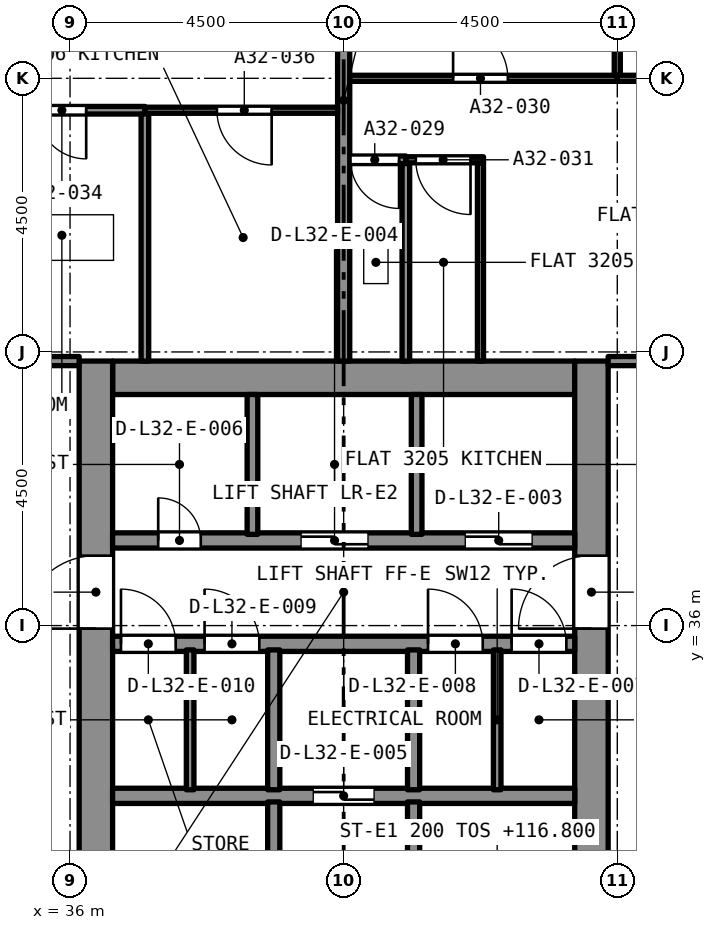
"""IFC4 building model, lengths in metres.
Left out: names, types, materials, properties, quantities, classifications, styles, units other than length and angle.
Written with IfcOpenShell. Run it as: python <this file> out.ifc"""

import sys

from ifc_helpers import new_model, si_unit, direction, frame, frame_2d, origin, place, context, subcontext, project, spatial, rectangle, extrude, element, fill, save


model = new_model("IFC4")
c1 = context("Model", 3, precision=1e-05, world=origin(), true_north=direction((0.0, 1.0)))
c2 = subcontext(c1, "Body", "Model", "MODEL_VIEW")
j1 = project(units=[si_unit("LENGTHUNIT", "METRE"), si_unit("PLANEANGLEUNIT", "RADIAN")], contexts=[c1])
p1 = place(None, origin())
s1 = spatial("IfcSite", under=j1, at=p1, CompositionType="ELEMENT")
p2 = place(p1, origin())
s2 = spatial("IfcBuilding", under=s1, at=p2, CompositionType="ELEMENT")
p3 = place(p2, frame((0.0, 0.0, 115.2)))
s3 = spatial("IfcBuildingStorey", under=s2, at=p3, CompositionType="ELEMENT", Elevation=115.2)
p4 = place(p3, frame((36.7, 40.075, 0.0), z_axis=(0.0, 0.0, 1.0), x_axis=(1.0, 0.0, 0.0)))
e1 = element("IfcWall", 1, at=p4, inside=s3, PredefinedType="SOLIDWALL", context=c2, shape_type="SweptSolid", body=[
    extrude(rectangle(XDim=7.6, YDim=0.55, at=frame_2d((3.8, 0.0))), origin(), (0.0, 0.0, 1.0), 3.2),
])
p5 = place(p3, frame((36.425, 27.15, 0.0), z_axis=(0.0, 0.0, 1.0), x_axis=(0.0, 1.0, 0.0)))
e2 = element("IfcWall", 2, at=p5, inside=s3, PredefinedType="SOLIDWALL", context=c2, shape_type="SweptSolid", body=[
    extrude(rectangle(XDim=13.2, YDim=0.55, at=frame_2d((6.6, 0.0))), origin(), (0.0, 0.0, 1.0), 3.2),
])
p6 = place(p5, frame((8.8, 0.0, 0.0)))
e3 = element("IfcOpeningElement", 3, at=p6, cuts=e2, PredefinedType="OPENING", context=c2, shape_type="SweptSolid", body=[
    extrude(rectangle(XDim=1.2, YDim=2.1, at=frame_2d((0.6, 1.05))), frame((0.0, 0.285, 0.0), z_axis=(0.0, -1.0, 0.0), x_axis=(1.0, 0.0, 0.0)), (0.0, 0.0, 1.0), 0.57),
])
p7 = place(p3, frame((44.575, 27.15, 0.0), z_axis=(0.0, 0.0, 1.0), x_axis=(0.0, 1.0, 0.0)))
e4 = element("IfcWall", 4, at=p7, inside=s3, PredefinedType="SOLIDWALL", context=c2, shape_type="SweptSolid", body=[
    extrude(rectangle(XDim=13.2, YDim=0.55, at=frame_2d((6.6, 0.0))), origin(), (0.0, 0.0, 1.0), 3.2),
])
p8 = place(p7, frame((8.8, 0.0, 0.0)))
e5 = element("IfcOpeningElement", 5, at=p8, cuts=e4, PredefinedType="OPENING", context=c2, shape_type="SweptSolid", body=[
    extrude(rectangle(XDim=1.2, YDim=2.1, at=frame_2d((0.6, 1.05))), frame((0.0, 0.285, 0.0), z_axis=(0.0, -1.0, 0.0), x_axis=(1.0, 0.0, 0.0)), (0.0, 0.0, 1.0), 0.57),
])
p9 = place(p3, frame((41.523, 43.66, 0.0), z_axis=(0.0, 0.0, 1.0), x_axis=(-1.0, 0.0, 0.0)))
e6 = element("IfcWall", 6, at=p9, inside=s3, PredefinedType="PARTITIONING", context=c2, shape_type="SweptSolid", body=[
    extrude(rectangle(XDim=0.923, YDim=0.125, at=frame_2d((0.461, 0.0))), origin(), (0.0, 0.0, 1.0), 2.9),
])
p10 = place(p9, frame((0.111, 0.0, 0.0)))
e7 = element("IfcOpeningElement", 7, at=p10, cuts=e6, PredefinedType="OPENING", context=c2, shape_type="SweptSolid", body=[
    extrude(rectangle(XDim=0.8, YDim=2.1, at=frame_2d((0.4, 1.05))), frame((0.0, 0.073, 0.0), z_axis=(0.0, -1.0, 0.0), x_axis=(1.0, 0.0, 0.0)), (0.0, 0.0, 1.0), 0.145),
])
p11 = place(p3, frame((41.523, 40.35, 0.0), z_axis=(0.0, 0.0, 1.0), x_axis=(0.0, 1.0, 0.0)))
e8 = element("IfcWall", 8, at=p11, inside=s3, PredefinedType="PARTITIONING", context=c2, shape_type="SweptSolid", body=[
    extrude(rectangle(XDim=3.247, YDim=0.125, at=frame_2d((1.624, 0.0))), origin(), (0.0, 0.0, 1.0), 2.9),
])
p12 = place(p3, frame((40.5, 40.35, 0.0), z_axis=(0.0, 0.0, 1.0), x_axis=(0.0, 1.0, 0.0)))
e9 = element("IfcWall", 9, at=p12, inside=s3, PredefinedType="PARTITIONING", context=c2, shape_type="SweptSolid", body=[
    extrude(rectangle(XDim=8.575, YDim=0.2, at=frame_2d((4.288, 0.0))), origin(), (0.0, 0.0, 1.0), 2.9),
])
p13 = place(p3, frame((40.6, 45.0, 0.0), z_axis=(0.0, 0.0, 1.0), x_axis=(1.0, 0.0, 0.0)))
e10 = element("IfcWall", 10, at=p13, inside=s3, PredefinedType="PARTITIONING", context=c2, shape_type="SweptSolid", body=[
    extrude(rectangle(XDim=4.4, YDim=0.1, at=frame_2d((2.2, 0.0))), origin(), (0.0, 0.0, 1.0), 2.9),
])
p14 = place(p13, frame((1.7, 0.0, 0.0)))
e11 = element("IfcOpeningElement", 11, at=p14, cuts=e10, PredefinedType="OPENING", context=c2, shape_type="SweptSolid", body=[
    extrude(rectangle(XDim=0.9, YDim=2.1, at=frame_2d((0.45, 1.05))), frame((0.0, 0.06, 0.0), z_axis=(0.0, -1.0, 0.0), x_axis=(1.0, 0.0, 0.0)), (0.0, 0.0, 1.0), 0.12),
])
p15 = place(p3, frame((45.0, 45.05, 0.0), z_axis=(0.0, 0.0, 1.0), x_axis=(0.0, 1.0, 0.0)))
e12 = element("IfcWall", 12, at=p15, inside=s3, PredefinedType="PARTITIONING", context=c2, shape_type="SweptSolid", body=[
    extrude(rectangle(XDim=3.828, YDim=0.1, at=frame_2d((1.914, 0.0))), origin(), (0.0, 0.0, 1.0), 2.9),
])
p16 = place(p3, frame((42.75, 40.35, 0.0), z_axis=(0.0, 0.0, 1.0), x_axis=(0.0, 1.0, 0.0)))
e13 = element("IfcWall", 13, at=p16, inside=s3, PredefinedType="PARTITIONING", context=c2, shape_type="SweptSolid", body=[
    extrude(rectangle(XDim=3.26, YDim=0.1, at=frame_2d((1.63, 0.0))), origin(), (0.0, 0.0, 1.0), 2.9),
])
p17 = place(p3, frame((42.8, 43.66, 0.0), z_axis=(0.0, 0.0, 1.0), x_axis=(-1.0, 0.0, 0.0)))
e14 = element("IfcWall", 14, at=p17, inside=s3, PredefinedType="PARTITIONING", context=c2, shape_type="SweptSolid", body=[
    extrude(rectangle(XDim=1.277, YDim=0.1, at=frame_2d((0.639, 0.0))), origin(), (0.0, 0.0, 1.0), 2.9),
])
p18 = place(p17, frame((0.214, 0.0, 0.0)))
e15 = element("IfcOpeningElement", 15, at=p18, cuts=e14, PredefinedType="OPENING", context=c2, shape_type="SweptSolid", body=[
    extrude(rectangle(XDim=0.9, YDim=2.1, at=frame_2d((0.45, 1.05))), frame((0.0, 0.06, 0.0), z_axis=(0.0, -1.0, 0.0), x_axis=(1.0, 0.0, 0.0)), (0.0, 0.0, 1.0), 0.12),
])
p19 = place(p3, frame((45.0, 45.0, 0.0), z_axis=(0.0, 0.0, 1.0), x_axis=(1.0, 0.0, 0.0)))
e16 = element("IfcWall", 16, at=p19, inside=s3, PredefinedType="PARTITIONING", context=c2, shape_type="SweptSolid", body=[
    extrude(rectangle(XDim=3.878, YDim=0.1, at=frame_2d((1.939, 0.0))), origin(), (0.0, 0.0, 1.0), 2.9),
])
p20 = place(p19, frame((1.462, 0.0, 0.0)))
e17 = element("IfcOpeningElement", 17, at=p20, cuts=e16, PredefinedType="OPENING", context=c2, shape_type="SweptSolid", body=[
    extrude(rectangle(XDim=1.0, YDim=2.1, at=frame_2d((0.5, 1.05))), frame((0.0, 0.06, 0.0), z_axis=(0.0, -1.0, 0.0), x_axis=(1.0, 0.0, 0.0)), (0.0, 0.0, 1.0), 0.12),
])
p21 = place(p3, frame((44.85, 40.35, 0.0), z_axis=(0.0, 0.0, 1.0), x_axis=(1.0, 0.0, 0.0)))
e18 = element("IfcWall", 18, at=p21, inside=s3, PredefinedType="PARTITIONING", context=c2, shape_type="SweptSolid", body=[
    extrude(rectangle(XDim=4.075, YDim=0.15, at=frame_2d((2.038, 0.0))), origin(), (0.0, 0.0, 1.0), 2.9),
])
p22 = place(p21, frame((1.9, 0.0, 0.0)))
e19 = element("IfcOpeningElement", 19, at=p22, cuts=e18, PredefinedType="OPENING", context=c2, shape_type="SweptSolid", body=[
    extrude(rectangle(XDim=1.0, YDim=2.1, at=frame_2d((0.5, 1.05))), frame((0.0, 0.085, 0.0), z_axis=(0.0, -1.0, 0.0), x_axis=(1.0, 0.0, 0.0)), (0.0, 0.0, 1.0), 0.17),
])
p23 = place(p3, frame((37.231, 44.475, 0.0), z_axis=(0.0, 0.0, 1.0), x_axis=(-1.0, 0.0, 0.0)))
e20 = element("IfcWall", 20, at=p23, inside=s3, PredefinedType="PARTITIONING", context=c2, shape_type="SweptSolid", body=[
    extrude(rectangle(XDim=2.794, YDim=0.125, at=frame_2d((1.397, 0.0))), origin(), (0.0, 0.0, 1.0), 2.9),
])
p24 = place(p23, frame((0.966, 0.0, 0.0)))
e21 = element("IfcOpeningElement", 21, at=p24, cuts=e20, PredefinedType="OPENING", context=c2, shape_type="SweptSolid", body=[
    extrude(rectangle(XDim=0.8, YDim=2.1, at=frame_2d((0.4, 1.05))), frame((0.0, 0.073, 0.0), z_axis=(0.0, -1.0, 0.0), x_axis=(1.0, 0.0, 0.0)), (0.0, 0.0, 1.0), 0.145),
])
p25 = place(p3, frame((37.231, 40.35, 0.0), z_axis=(0.0, 0.0, 1.0), x_axis=(0.0, 1.0, 0.0)))
e22 = element("IfcWall", 22, at=p25, inside=s3, PredefinedType="PARTITIONING", context=c2, shape_type="SweptSolid", body=[
    extrude(rectangle(XDim=4.062, YDim=0.125, at=frame_2d((2.031, 0.0))), origin(), (0.0, 0.0, 1.0), 2.9),
])
p26 = place(p3, frame((34.5, 40.35, 0.0), z_axis=(0.0, 0.0, 1.0), x_axis=(1.0, 0.0, 0.0)))
e23 = element("IfcWall", 23, at=p26, inside=s3, PredefinedType="PARTITIONING", context=c2, shape_type="SweptSolid", body=[
    extrude(rectangle(XDim=1.65, YDim=0.15, at=frame_2d((0.825, 0.0))), origin(), (0.0, 0.0, 1.0), 2.9),
])
p27 = place(p3, frame((40.4, 44.475, 0.0), z_axis=(0.0, 0.0, 1.0), x_axis=(-1.0, 0.0, 0.0)))
e24 = element("IfcWall", 24, at=p27, inside=s3, PredefinedType="PARTITIONING", context=c2, shape_type="SweptSolid", body=[
    extrude(rectangle(XDim=3.168, YDim=0.1, at=frame_2d((1.584, 0.0))), origin(), (0.0, 0.0, 1.0), 2.9),
])
p28 = place(p27, frame((1.084, 0.0, 0.0)))
e25 = element("IfcOpeningElement", 25, at=p28, cuts=e24, PredefinedType="OPENING", context=c2, shape_type="SweptSolid", body=[
    extrude(rectangle(XDim=0.9, YDim=2.1, at=frame_2d((0.45, 1.05))), frame((0.0, 0.06, 0.0), z_axis=(0.0, -1.0, 0.0), x_axis=(1.0, 0.0, 0.0)), (0.0, 0.0, 1.0), 0.12),
])
p29 = place(p3, frame((36.7, 33.2, 0.0), z_axis=(0.0, 0.0, 1.0), x_axis=(1.0, 0.0, 0.0)))
e26 = element("IfcWall", 26, at=p29, inside=s3, PredefinedType="SOLIDWALL", context=c2, shape_type="SweptSolid", body=[
    extrude(rectangle(XDim=7.6, YDim=0.25, at=frame_2d((3.8, 0.0))), origin(), (0.0, 0.0, 1.0), 2.9),
])
p30 = place(p29, frame((3.3, 0.0, 0.0)))
e27 = element("IfcOpeningElement", 27, at=p30, cuts=e26, PredefinedType="OPENING", context=c2, shape_type="SweptSolid", body=[
    extrude(rectangle(XDim=1.0, YDim=2.1, at=frame_2d((0.5, 1.05))), frame((0.0, 0.135, 0.0), z_axis=(0.0, -1.0, 0.0), x_axis=(1.0, 0.0, 0.0)), (0.0, 0.0, 1.0), 0.27),
])
p31 = place(p3, frame((36.7, 35.7, 0.0), z_axis=(0.0, 0.0, 1.0), x_axis=(1.0, 0.0, 0.0)))
e28 = element("IfcWall", 28, at=p31, inside=s3, PredefinedType="SOLIDWALL", context=c2, shape_type="SweptSolid", body=[
    extrude(rectangle(XDim=7.6, YDim=0.25, at=frame_2d((3.8, 0.0))), origin(), (0.0, 0.0, 1.0), 2.9),
])
p32 = place(p31, frame((6.562, 0.0, 0.0)))
e29 = element("IfcOpeningElement", 29, at=p32, cuts=e28, PredefinedType="OPENING", context=c2, shape_type="SweptSolid", body=[
    extrude(rectangle(XDim=0.9, YDim=2.1, at=frame_2d((0.45, 1.05))), frame((0.0, 0.135, 0.0), z_axis=(0.0, -1.0, 0.0), x_axis=(1.0, 0.0, 0.0)), (0.0, 0.0, 1.0), 0.27),
])
p33 = place(p31, frame((5.188, 0.0, 0.0)))
e30 = element("IfcOpeningElement", 30, at=p33, cuts=e28, PredefinedType="OPENING", context=c2, shape_type="SweptSolid", body=[
    extrude(rectangle(XDim=0.9, YDim=2.1, at=frame_2d((0.45, 1.05))), frame((0.0, 0.135, 0.0), z_axis=(0.0, -1.0, 0.0), x_axis=(1.0, 0.0, 0.0)), (0.0, 0.0, 1.0), 0.27),
])
p34 = place(p31, frame((1.512, 0.0, 0.0)))
e31 = element("IfcOpeningElement", 31, at=p34, cuts=e28, PredefinedType="OPENING", context=c2, shape_type="SweptSolid", body=[
    extrude(rectangle(XDim=0.9, YDim=2.1, at=frame_2d((0.45, 1.05))), frame((0.0, 0.135, 0.0), z_axis=(0.0, -1.0, 0.0), x_axis=(1.0, 0.0, 0.0)), (0.0, 0.0, 1.0), 0.27),
])
p35 = place(p31, frame((0.137, 0.0, 0.0)))
e32 = element("IfcOpeningElement", 32, at=p35, cuts=e28, PredefinedType="OPENING", context=c2, shape_type="SweptSolid", body=[
    extrude(rectangle(XDim=0.9, YDim=2.1, at=frame_2d((0.45, 1.05))), frame((0.0, 0.135, 0.0), z_axis=(0.0, -1.0, 0.0), x_axis=(1.0, 0.0, 0.0)), (0.0, 0.0, 1.0), 0.27),
])
p36 = place(p3, frame((36.7, 37.4, 0.0), z_axis=(0.0, 0.0, 1.0), x_axis=(1.0, 0.0, 0.0)))
e33 = element("IfcWall", 33, at=p36, inside=s3, PredefinedType="SOLIDWALL", context=c2, shape_type="SweptSolid", body=[
    extrude(rectangle(XDim=7.6, YDim=0.25, at=frame_2d((3.8, 0.0))), origin(), (0.0, 0.0, 1.0), 2.9),
])
p37 = place(p36, frame((5.8, 0.0, 0.0)))
e34 = element("IfcOpeningElement", 34, at=p37, cuts=e33, PredefinedType="OPENING", context=c2, shape_type="SweptSolid", body=[
    extrude(rectangle(XDim=1.1, YDim=2.4, at=frame_2d((0.55, 1.2))), frame((0.0, 0.135, 0.0), z_axis=(0.0, -1.0, 0.0), x_axis=(1.0, 0.0, 0.0)), (0.0, 0.0, 1.0), 0.27),
])
p38 = place(p36, frame((3.1, 0.0, 0.0)))
e35 = element("IfcOpeningElement", 35, at=p38, cuts=e33, PredefinedType="OPENING", context=c2, shape_type="SweptSolid", body=[
    extrude(rectangle(XDim=1.1, YDim=2.4, at=frame_2d((0.55, 1.2))), frame((0.0, 0.135, 0.0), z_axis=(0.0, -1.0, 0.0), x_axis=(1.0, 0.0, 0.0)), (0.0, 0.0, 1.0), 0.27),
])
p39 = place(p36, frame((0.75, 0.0, 0.0)))
e36 = element("IfcOpeningElement", 36, at=p39, cuts=e33, PredefinedType="OPENING", context=c2, shape_type="SweptSolid", body=[
    extrude(rectangle(XDim=0.7, YDim=2.1, at=frame_2d((0.35, 1.05))), frame((0.0, 0.135, 0.0), z_axis=(0.0, -1.0, 0.0), x_axis=(1.0, 0.0, 0.0)), (0.0, 0.0, 1.0), 0.27),
])
p40 = place(p3, frame((41.65, 27.7, 0.0), z_axis=(0.0, 0.0, 1.0), x_axis=(0.0, 1.0, 0.0)))
e37 = element("IfcWall", 37, at=p40, inside=s3, PredefinedType="SOLIDWALL", context=c2, shape_type="SweptSolid", body=[
    extrude(rectangle(XDim=5.4, YDim=0.2, at=frame_2d((2.7, 0.0))), origin(), (0.0, 0.0, 1.0), 2.9),
])
p41 = place(p40, frame((0.2, 0.0, 0.0)))
e38 = element("IfcOpeningElement", 38, at=p41, cuts=e37, PredefinedType="OPENING", context=c2, shape_type="SweptSolid", body=[
    extrude(rectangle(XDim=0.9, YDim=2.1, at=frame_2d((0.45, 1.05))), frame((0.0, 0.11, 0.0), z_axis=(0.0, -1.0, 0.0), x_axis=(1.0, 0.0, 0.0)), (0.0, 0.0, 1.0), 0.22),
])
p42 = place(p3, frame((39.35, 27.7, 0.0), z_axis=(0.0, 0.0, 1.0), x_axis=(0.0, 1.0, 0.0)))
e39 = element("IfcWall", 39, at=p42, inside=s3, PredefinedType="SOLIDWALL", context=c2, shape_type="SweptSolid", body=[
    extrude(rectangle(XDim=5.4, YDim=0.2, at=frame_2d((2.7, 0.0))), origin(), (0.0, 0.0, 1.0), 2.9),
])
p43 = place(p42, frame((0.2, 0.0, 0.0)))
e40 = element("IfcOpeningElement", 40, at=p43, cuts=e39, PredefinedType="OPENING", context=c2, shape_type="SweptSolid", body=[
    extrude(rectangle(XDim=0.9, YDim=2.1, at=frame_2d((0.45, 1.05))), frame((0.0, 0.11, 0.0), z_axis=(0.0, -1.0, 0.0), x_axis=(1.0, 0.0, 0.0)), (0.0, 0.0, 1.0), 0.22),
])
for number, where, z_axis, x_axis in (
    (41, (41.65, 33.3, 0.0), (0.0, 0.0, 1.0), (0.0, 1.0, 0.0)),
    (42, (39.35, 33.3, 0.0), (0.0, 0.0, 1.0), (0.0, 1.0, 0.0)),
):
    element("IfcWall", number, at=place(p3, frame(where, z_axis=z_axis, x_axis=x_axis)), inside=s3, PredefinedType="SOLIDWALL", context=c2, shape_type="SweptSolid", body=[
        extrude(rectangle(XDim=2.3, YDim=0.2, at=frame_2d((1.15, 0.0))), origin(), (0.0, 0.0, 1.0), 2.9),
    ])
for number, where, z_axis, x_axis in (
    (43, (41.7, 37.5, 0.0), (0.0, 0.0, 1.0), (0.0, 1.0, 0.0)),
    (44, (39.0, 37.5, 0.0), (0.0, 0.0, 1.0), (0.0, 1.0, 0.0)),
):
    element("IfcWall", number, at=place(p3, frame(where, z_axis=z_axis, x_axis=x_axis)), inside=s3, PredefinedType="SOLIDWALL", context=c2, shape_type="SweptSolid", body=[
        extrude(rectangle(XDim=2.3, YDim=0.175, at=frame_2d((1.15, 0.0))), origin(), (0.0, 0.0, 1.0), 2.9),
    ])
for number, where, z_axis, x_axis in (
    (45, (43.025, 33.3, 0.0), (0.0, 0.0, 1.0), (0.0, 1.0, 0.0)),
    (46, (37.975, 33.3, 0.0), (0.0, 0.0, 1.0), (0.0, 1.0, 0.0)),
):
    element("IfcWall", number, at=place(p3, frame(where, z_axis=z_axis, x_axis=x_axis)), inside=s3, PredefinedType="PARTITIONING", context=c2, shape_type="SweptSolid", body=[
        extrude(rectangle(XDim=2.3, YDim=0.125, at=frame_2d((1.15, 0.0))), origin(), (0.0, 0.0, 1.0), 2.9),
    ])
p44 = place(p10, origin())
e47 = element("IfcDoor", 47, at=p44, inside=s3, OperationType="SINGLE_SWING_RIGHT", PredefinedType="DOOR", context=c2, shape_type="SweptSolid", body=[
    extrude(rectangle(XDim=0.8, YDim=2.1, at=frame_2d((0.4, 1.05))), frame((0.0, 0.025, 0.0), z_axis=(0.0, -1.0, 0.0), x_axis=(1.0, 0.0, 0.0)), (0.0, 0.0, 1.0), 0.05),
])
fill(e7, e47)
p45 = place(p14, origin())
e48 = element("IfcDoor", 48, at=p45, inside=s3, OperationType="SINGLE_SWING_LEFT", PredefinedType="DOOR", context=c2, shape_type="SweptSolid", body=[
    extrude(rectangle(XDim=0.9, YDim=2.1, at=frame_2d((0.45, 1.05))), frame((0.0, 0.025, 0.0), z_axis=(0.0, -1.0, 0.0), x_axis=(1.0, 0.0, 0.0)), (0.0, 0.0, 1.0), 0.05),
])
fill(e11, e48)
p46 = place(p18, origin())
e49 = element("IfcDoor", 49, at=p46, inside=s3, OperationType="SINGLE_SWING_RIGHT", PredefinedType="DOOR", context=c2, shape_type="SweptSolid", body=[
    extrude(rectangle(XDim=0.9, YDim=2.1, at=frame_2d((0.45, 1.05))), frame((0.0, 0.025, 0.0), z_axis=(0.0, -1.0, 0.0), x_axis=(1.0, 0.0, 0.0)), (0.0, 0.0, 1.0), 0.05),
])
fill(e15, e49)
p47 = place(p24, origin())
e50 = element("IfcDoor", 50, at=p47, inside=s3, OperationType="SINGLE_SWING_LEFT", PredefinedType="DOOR", context=c2, shape_type="SweptSolid", body=[
    extrude(rectangle(XDim=0.8, YDim=2.1, at=frame_2d((0.4, 1.05))), frame((0.0, 0.025, 0.0), z_axis=(0.0, -1.0, 0.0), x_axis=(1.0, 0.0, 0.0)), (0.0, 0.0, 1.0), 0.05),
])
fill(e21, e50)
p48 = place(p28, origin())
e51 = element("IfcDoor", 51, at=p48, inside=s3, OperationType="SINGLE_SWING_LEFT", PredefinedType="DOOR", context=c2, shape_type="SweptSolid", body=[
    extrude(rectangle(XDim=0.9, YDim=2.1, at=frame_2d((0.45, 1.05))), frame((0.0, 0.025, 0.0), z_axis=(0.0, -1.0, 0.0), x_axis=(1.0, 0.0, 0.0)), (0.0, 0.0, 1.0), 0.05),
])
fill(e25, e51)
p49 = place(p37, origin())
e52 = element("IfcDoor", 52, at=p49, inside=s3, OperationType="SLIDING_TO_LEFT", PredefinedType="DOOR", context=c2, shape_type="SweptSolid", body=[
    extrude(rectangle(XDim=1.1, YDim=2.4, at=frame_2d((0.55, 1.2))), frame((0.0, 0.025, 0.0), z_axis=(0.0, -1.0, 0.0), x_axis=(1.0, 0.0, 0.0)), (0.0, 0.0, 1.0), 0.05),
])
fill(e34, e52)
p50 = place(p38, origin())
e53 = element("IfcDoor", 53, at=p50, inside=s3, OperationType="SLIDING_TO_LEFT", PredefinedType="DOOR", context=c2, shape_type="SweptSolid", body=[
    extrude(rectangle(XDim=1.1, YDim=2.4, at=frame_2d((0.55, 1.2))), frame((0.0, 0.025, 0.0), z_axis=(0.0, -1.0, 0.0), x_axis=(1.0, 0.0, 0.0)), (0.0, 0.0, 1.0), 0.05),
])
fill(e35, e53)
p51 = place(p30, origin())
e54 = element("IfcDoor", 54, at=p51, inside=s3, OperationType="SLIDING_TO_LEFT", PredefinedType="DOOR", context=c2, shape_type="SweptSolid", body=[
    extrude(rectangle(XDim=1.0, YDim=2.1, at=frame_2d((0.5, 1.05))), frame((0.0, 0.025, 0.0), z_axis=(0.0, -1.0, 0.0), x_axis=(1.0, 0.0, 0.0)), (0.0, 0.0, 1.0), 0.05),
])
fill(e27, e54)
p52 = place(p39, origin())
e55 = element("IfcDoor", 55, at=p52, inside=s3, OperationType="SINGLE_SWING_LEFT", PredefinedType="DOOR", context=c2, shape_type="SweptSolid", body=[
    extrude(rectangle(XDim=0.7, YDim=2.1, at=frame_2d((0.35, 1.05))), frame((0.0, 0.025, 0.0), z_axis=(0.0, -1.0, 0.0), x_axis=(1.0, 0.0, 0.0)), (0.0, 0.0, 1.0), 0.05),
])
fill(e36, e55)
p53 = place(p32, origin())
e56 = element("IfcDoor", 56, at=p53, inside=s3, OperationType="SINGLE_SWING_LEFT", PredefinedType="DOOR", context=c2, shape_type="SweptSolid", body=[
    extrude(rectangle(XDim=0.9, YDim=2.1, at=frame_2d((0.45, 1.05))), frame((0.0, 0.025, 0.0), z_axis=(0.0, -1.0, 0.0), x_axis=(1.0, 0.0, 0.0)), (0.0, 0.0, 1.0), 0.05),
])
fill(e29, e56)
p54 = place(p33, origin())
e57 = element("IfcDoor", 57, at=p54, inside=s3, OperationType="SINGLE_SWING_LEFT", PredefinedType="DOOR", context=c2, shape_type="SweptSolid", body=[
    extrude(rectangle(XDim=0.9, YDim=2.1, at=frame_2d((0.45, 1.05))), frame((0.0, 0.025, 0.0), z_axis=(0.0, -1.0, 0.0), x_axis=(1.0, 0.0, 0.0)), (0.0, 0.0, 1.0), 0.05),
])
fill(e30, e57)
p55 = place(p34, origin())
e58 = element("IfcDoor", 58, at=p55, inside=s3, OperationType="SINGLE_SWING_LEFT", PredefinedType="DOOR", context=c2, shape_type="SweptSolid", body=[
    extrude(rectangle(XDim=0.9, YDim=2.1, at=frame_2d((0.45, 1.05))), frame((0.0, 0.025, 0.0), z_axis=(0.0, -1.0, 0.0), x_axis=(1.0, 0.0, 0.0)), (0.0, 0.0, 1.0), 0.05),
])
fill(e31, e58)
p56 = place(p35, origin())
e59 = element("IfcDoor", 59, at=p56, inside=s3, OperationType="SINGLE_SWING_LEFT", PredefinedType="DOOR", context=c2, shape_type="SweptSolid", body=[
    extrude(rectangle(XDim=0.9, YDim=2.1, at=frame_2d((0.45, 1.05))), frame((0.0, 0.025, 0.0), z_axis=(0.0, -1.0, 0.0), x_axis=(1.0, 0.0, 0.0)), (0.0, 0.0, 1.0), 0.05),
])
fill(e32, e59)
p57 = place(p6, origin())
e60 = element("IfcDoor", 60, at=p57, inside=s3, OperationType="SINGLE_SWING_LEFT", PredefinedType="DOOR", context=c2, shape_type="SweptSolid", body=[
    extrude(rectangle(XDim=1.2, YDim=2.1, at=frame_2d((0.6, 1.05))), frame((0.0, 0.025, 0.0), z_axis=(0.0, -1.0, 0.0), x_axis=(1.0, 0.0, 0.0)), (0.0, 0.0, 1.0), 0.05),
])
fill(e3, e60)
p58 = place(p8, origin())
e61 = element("IfcDoor", 61, at=p58, inside=s3, OperationType="SINGLE_SWING_LEFT", PredefinedType="DOOR", context=c2, shape_type="SweptSolid", body=[
    extrude(rectangle(XDim=1.2, YDim=2.1, at=frame_2d((0.6, 1.05))), frame((0.0, 0.025, 0.0), z_axis=(0.0, -1.0, 0.0), x_axis=(1.0, 0.0, 0.0)), (0.0, 0.0, 1.0), 0.05),
])
fill(e5, e61)
save(model, sys.argv[1])
